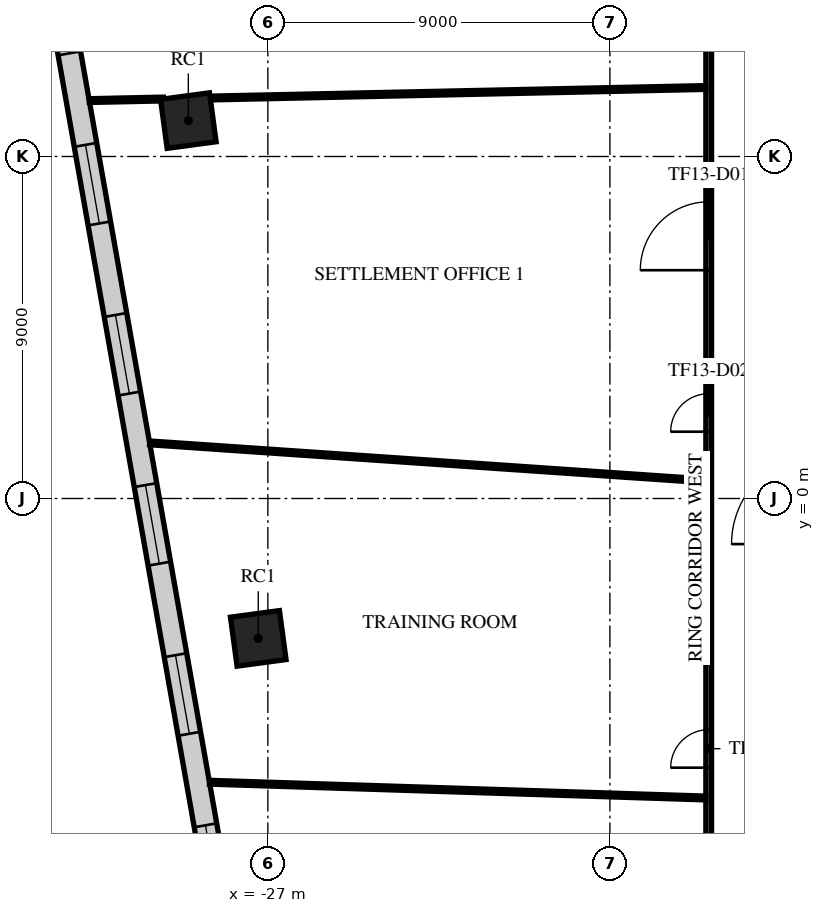
"""IFC4 building model, lengths in metres.
Left out: names, types, materials, properties, quantities, classifications, styles, units other than length and angle.
Written with IfcOpenShell. Run it as: python <this file> out.ifc"""

import sys

from ifc_helpers import new_model, si_unit, direction, frame, frame_2d, origin, origin_2d, place, context, subcontext, project, spatial, rectangle, extrude, element, fill, save


model = new_model("IFC4")
c1 = context("Model", 3, precision=1e-05, world=origin(), true_north=direction((0.0, 1.0)))
c2 = subcontext(c1, "Body", "Model", "MODEL_VIEW")
j1 = project(units=[si_unit("LENGTHUNIT", "METRE"), si_unit("PLANEANGLEUNIT", "RADIAN")], contexts=[c1])
p1 = place(None, origin())
s1 = spatial("IfcSite", under=j1, at=p1, CompositionType="ELEMENT")
p2 = place(p1, origin())
s2 = spatial("IfcBuilding", under=s1, at=p2, CompositionType="ELEMENT")
p3 = place(p2, frame((0.0, 0.0, 59.7)))
s3 = spatial("IfcBuildingStorey", under=s2, at=p3, CompositionType="ELEMENT", Elevation=59.7)
for number, where, z_axis, x_axis in (
    (1, (-29.093, 9.945, 0.0), (0.0, 0.0, 1.0), (0.991, 0.134, 0.0)),
    (2, (-27.253, -3.681, 0.0), (0.0, 0.0, 1.0), (0.991, 0.134, 0.0)),
):
    element("IfcColumn", number, at=place(p3, frame(where, z_axis=z_axis, x_axis=x_axis)), inside=s3, PredefinedType="COLUMN", context=c2, shape_type="SweptSolid", body=[
        extrude(rectangle(XDim=1.3, YDim=1.3, at=origin_2d()), origin(), (0.0, 0.0, 1.0), 4.2),
    ])
p4 = place(p3, frame((-33.568, 19.341, 0.0), z_axis=(0.0, 0.0, 1.0), x_axis=(0.173645642064, -0.984808200104, 0.0)))
e3 = element("IfcWall", 3, at=p4, inside=s3, PredefinedType="STANDARD", context=c2, shape_type="SweptSolid", body=[
    extrude(rectangle(XDim=49.752, YDim=0.6, at=frame_2d((24.876, 0.0))), origin(), (0.0, 0.0, 1.0), 3.75),
])
p5 = place(p4, frame((1.161, 0.0, 0.9)))
e4 = element("IfcOpeningElement", 4, at=p5, cuts=e3, PredefinedType="OPENING", context=c2, shape_type="SweptSolid", body=[
    extrude(rectangle(XDim=2.1, YDim=2.1, at=frame_2d((1.05, 1.05))), frame((0.0, 0.31, 0.0), z_axis=(0.0, -1.0, 0.0), x_axis=(1.0, 0.0, 0.0)), (0.0, 0.0, 1.0), 0.62),
])
p6 = place(p4, frame((5.644, 0.0, 0.9)))
e5 = element("IfcOpeningElement", 5, at=p6, cuts=e3, PredefinedType="OPENING", context=c2, shape_type="SweptSolid", body=[
    extrude(rectangle(XDim=2.1, YDim=2.1, at=frame_2d((1.05, 1.05))), frame((0.0, 0.31, 0.0), z_axis=(0.0, -1.0, 0.0), x_axis=(1.0, 0.0, 0.0)), (0.0, 0.0, 1.0), 0.62),
])
p7 = place(p4, frame((10.189, 0.0, 0.9)))
e6 = element("IfcOpeningElement", 6, at=p7, cuts=e3, PredefinedType="OPENING", context=c2, shape_type="SweptSolid", body=[
    extrude(rectangle(XDim=2.1, YDim=2.1, at=frame_2d((1.05, 1.05))), frame((0.0, 0.31, 0.0), z_axis=(0.0, -1.0, 0.0), x_axis=(1.0, 0.0, 0.0)), (0.0, 0.0, 1.0), 0.62),
])
p8 = place(p4, frame((14.735, 0.0, 0.9)))
e7 = element("IfcOpeningElement", 7, at=p8, cuts=e3, PredefinedType="OPENING", context=c2, shape_type="SweptSolid", body=[
    extrude(rectangle(XDim=2.1, YDim=2.1, at=frame_2d((1.05, 1.05))), frame((0.0, 0.31, 0.0), z_axis=(0.0, -1.0, 0.0), x_axis=(1.0, 0.0, 0.0)), (0.0, 0.0, 1.0), 0.62),
])
p9 = place(p4, frame((19.28, 0.0, 0.9)))
e8 = element("IfcOpeningElement", 8, at=p9, cuts=e3, PredefinedType="OPENING", context=c2, shape_type="SweptSolid", body=[
    extrude(rectangle(XDim=2.1, YDim=2.1, at=frame_2d((1.05, 1.05))), frame((0.0, 0.31, 0.0), z_axis=(0.0, -1.0, 0.0), x_axis=(1.0, 0.0, 0.0)), (0.0, 0.0, 1.0), 0.62),
])
p10 = place(p4, frame((23.826, 0.0, 0.9)))
e9 = element("IfcOpeningElement", 9, at=p10, cuts=e3, PredefinedType="OPENING", context=c2, shape_type="SweptSolid", body=[
    extrude(rectangle(XDim=2.1, YDim=2.1, at=frame_2d((1.05, 1.05))), frame((0.0, 0.31, 0.0), z_axis=(0.0, -1.0, 0.0), x_axis=(1.0, 0.0, 0.0)), (0.0, 0.0, 1.0), 0.62),
])
p11 = place(p4, frame((28.371, 0.0, 0.9)))
e10 = element("IfcOpeningElement", 10, at=p11, cuts=e3, PredefinedType="OPENING", context=c2, shape_type="SweptSolid", body=[
    extrude(rectangle(XDim=2.1, YDim=2.1, at=frame_2d((1.05, 1.05))), frame((0.0, 0.31, 0.0), z_axis=(0.0, -1.0, 0.0), x_axis=(1.0, 0.0, 0.0)), (0.0, 0.0, 1.0), 0.62),
])
p12 = place(p4, frame((32.917, 0.0, 0.9)))
e11 = element("IfcOpeningElement", 11, at=p12, cuts=e3, PredefinedType="OPENING", context=c2, shape_type="SweptSolid", body=[
    extrude(rectangle(XDim=2.1, YDim=2.1, at=frame_2d((1.05, 1.05))), frame((0.0, 0.31, 0.0), z_axis=(0.0, -1.0, 0.0), x_axis=(1.0, 0.0, 0.0)), (0.0, 0.0, 1.0), 0.62),
])
p13 = place(p4, frame((37.462, 0.0, 0.9)))
e12 = element("IfcOpeningElement", 12, at=p13, cuts=e3, PredefinedType="OPENING", context=c2, shape_type="SweptSolid", body=[
    extrude(rectangle(XDim=2.1, YDim=2.1, at=frame_2d((1.05, 1.05))), frame((0.0, 0.31, 0.0), z_axis=(0.0, -1.0, 0.0), x_axis=(1.0, 0.0, 0.0)), (0.0, 0.0, 1.0), 0.62),
])
p14 = place(p4, frame((42.008, 0.0, 0.9)))
e13 = element("IfcOpeningElement", 13, at=p14, cuts=e3, PredefinedType="OPENING", context=c2, shape_type="SweptSolid", body=[
    extrude(rectangle(XDim=2.1, YDim=2.1, at=frame_2d((1.05, 1.05))), frame((0.0, 0.31, 0.0), z_axis=(0.0, -1.0, 0.0), x_axis=(1.0, 0.0, 0.0)), (0.0, 0.0, 1.0), 0.62),
])
p15 = place(p4, frame((46.491, 0.0, 0.9)))
e14 = element("IfcOpeningElement", 14, at=p15, cuts=e3, PredefinedType="OPENING", context=c2, shape_type="SweptSolid", body=[
    extrude(rectangle(XDim=2.1, YDim=2.1, at=frame_2d((1.05, 1.05))), frame((0.0, 0.31, 0.0), z_axis=(0.0, -1.0, 0.0), x_axis=(1.0, 0.0, 0.0)), (0.0, 0.0, 1.0), 0.62),
])
p16 = place(p3, frame((-15.4, -15.4, 0.0), z_axis=(0.0, 0.0, 1.0), x_axis=(0.0, 1.0, 0.0)))
e15 = element("IfcWall", 15, at=p16, inside=s3, PredefinedType="PARTITIONING", context=c2, shape_type="SweptSolid", body=[
    extrude(rectangle(XDim=30.8, YDim=0.15, at=frame_2d((15.4, 0.0))), origin(), (0.0, 0.0, 1.0), 3.25),
])
p17 = place(p16, frame((21.408, 0.0, 0.0)))
e16 = element("IfcOpeningElement", 16, at=p17, cuts=e15, PredefinedType="OPENING", context=c2, shape_type="SweptSolid", body=[
    extrude(rectangle(XDim=1.8, YDim=2.1, at=frame_2d((0.9, 1.05))), frame((0.0, 0.085, 0.0), z_axis=(0.0, -1.0, 0.0), x_axis=(1.0, 0.0, 0.0)), (0.0, 0.0, 1.0), 0.17),
])
p18 = place(p16, frame((17.158, 0.0, 0.0)))
e17 = element("IfcOpeningElement", 17, at=p18, cuts=e15, PredefinedType="OPENING", context=c2, shape_type="SweptSolid", body=[
    extrude(rectangle(XDim=1.0, YDim=2.1, at=frame_2d((0.5, 1.05))), frame((0.0, 0.085, 0.0), z_axis=(0.0, -1.0, 0.0), x_axis=(1.0, 0.0, 0.0)), (0.0, 0.0, 1.0), 0.17),
])
p19 = place(p16, frame((8.316, 0.0, 0.0)))
e18 = element("IfcOpeningElement", 18, at=p19, cuts=e15, PredefinedType="OPENING", context=c2, shape_type="SweptSolid", body=[
    extrude(rectangle(XDim=1.0, YDim=2.1, at=frame_2d((0.5, 1.05))), frame((0.0, 0.085, 0.0), z_axis=(0.0, -1.0, 0.0), x_axis=(1.0, 0.0, 0.0)), (0.0, 0.0, 1.0), 0.17),
])
p20 = place(p16, frame((28.516, 0.0, 0.0)))
e19 = element("IfcOpeningElement", 19, at=p20, cuts=e15, PredefinedType="OPENING", context=c2, shape_type="SweptSolid", body=[
    extrude(rectangle(XDim=1.8, YDim=2.1, at=frame_2d((0.9, 1.05))), frame((0.0, 0.085, 0.0), z_axis=(0.0, -1.0, 0.0), x_axis=(1.0, 0.0, 0.0)), (0.0, 0.0, 1.0), 0.17),
])
p21 = place(p16, frame((2.8, 0.0, 0.0)))
e20 = element("IfcOpeningElement", 20, at=p21, cuts=e15, PredefinedType="OPENING", context=c2, shape_type="SweptSolid", body=[
    extrude(rectangle(XDim=1.0, YDim=2.1, at=frame_2d((0.5, 1.05))), frame((0.0, 0.085, 0.0), z_axis=(0.0, -1.0, 0.0), x_axis=(1.0, 0.0, 0.0)), (0.0, 0.0, 1.0), 0.17),
])
p22 = place(p3, frame((-31.698, 10.471, 0.0), z_axis=(0.0, 0.0, 1.0), x_axis=(0.999775991134, 0.021165243956, 0.0)))
e21 = element("IfcWall", 21, at=p22, inside=s3, PredefinedType="PARTITIONING", context=c2, shape_type="SweptSolid", body=[
    extrude(rectangle(XDim=1.949, YDim=0.1, at=frame_2d((0.975, 0.0))), origin(), (0.0, 0.0, 1.0), 3.75),
])
p23 = place(p3, frame((-30.11, 1.464, 0.0), z_axis=(0.0, 0.0, 1.0), x_axis=(0.997671325377, -0.068205032957, 0.0)))
e22 = element("IfcWall", 22, at=p23, inside=s3, PredefinedType="PARTITIONING", context=c2, shape_type="SweptSolid", body=[
    extrude(rectangle(XDim=14.665, YDim=0.1, at=frame_2d((7.333, 0.0))), origin(), (0.0, 0.0, 1.0), 2.95),
])
p24 = place(p3, frame((-28.535, -7.467, 0.0), z_axis=(0.0, 0.0, 1.0), x_axis=(0.999495289336, -0.031767382577, 0.0)))
e23 = element("IfcWall", 23, at=p24, inside=s3, PredefinedType="PARTITIONING", context=c2, shape_type="SweptSolid", body=[
    extrude(rectangle(XDim=13.065, YDim=0.1, at=frame_2d((6.532, 0.0))), origin(), (0.0, 0.0, 1.0), 2.95),
])
p25 = place(p3, frame((-28.517, 10.539, 0.0), z_axis=(0.0, 0.0, 1.0), x_axis=(0.999774736742, 0.02122441454, 0.0)))
e24 = element("IfcWall", 24, at=p25, inside=s3, PredefinedType="PARTITIONING", context=c2, shape_type="SweptSolid", body=[
    extrude(rectangle(XDim=13.044, YDim=0.1, at=frame_2d((6.522, 0.0))), origin(), (0.0, 0.0, 1.0), 3.25),
])
p26 = place(p6, origin())
e25 = element("IfcWindow", 25, at=p26, inside=s3, PartitioningType="SINGLE_PANEL", PredefinedType="WINDOW", context=c2, shape_type="SweptSolid", body=[
    extrude(rectangle(XDim=2.1, YDim=2.1, at=frame_2d((1.05, 1.05))), frame((0.0, 0.03, 0.0), z_axis=(0.0, -1.0, 0.0), x_axis=(1.0, 0.0, 0.0)), (0.0, 0.0, 1.0), 0.06),
])
fill(e5, e25)
p27 = place(p7, origin())
e26 = element("IfcWindow", 26, at=p27, inside=s3, PartitioningType="SINGLE_PANEL", PredefinedType="WINDOW", context=c2, shape_type="SweptSolid", body=[
    extrude(rectangle(XDim=2.1, YDim=2.1, at=frame_2d((1.05, 1.05))), frame((0.0, 0.03, 0.0), z_axis=(0.0, -1.0, 0.0), x_axis=(1.0, 0.0, 0.0)), (0.0, 0.0, 1.0), 0.06),
])
fill(e6, e26)
p28 = place(p8, origin())
e27 = element("IfcWindow", 27, at=p28, inside=s3, PartitioningType="SINGLE_PANEL", PredefinedType="WINDOW", context=c2, shape_type="SweptSolid", body=[
    extrude(rectangle(XDim=2.1, YDim=2.1, at=frame_2d((1.05, 1.05))), frame((0.0, 0.03, 0.0), z_axis=(0.0, -1.0, 0.0), x_axis=(1.0, 0.0, 0.0)), (0.0, 0.0, 1.0), 0.06),
])
fill(e7, e27)
p29 = place(p9, origin())
e28 = element("IfcWindow", 28, at=p29, inside=s3, PartitioningType="SINGLE_PANEL", PredefinedType="WINDOW", context=c2, shape_type="SweptSolid", body=[
    extrude(rectangle(XDim=2.1, YDim=2.1, at=frame_2d((1.05, 1.05))), frame((0.0, 0.03, 0.0), z_axis=(0.0, -1.0, 0.0), x_axis=(1.0, 0.0, 0.0)), (0.0, 0.0, 1.0), 0.06),
])
fill(e8, e28)
p30 = place(p10, origin())
e29 = element("IfcWindow", 29, at=p30, inside=s3, PartitioningType="SINGLE_PANEL", PredefinedType="WINDOW", context=c2, shape_type="SweptSolid", body=[
    extrude(rectangle(XDim=2.1, YDim=2.1, at=frame_2d((1.05, 1.05))), frame((0.0, 0.03, 0.0), z_axis=(0.0, -1.0, 0.0), x_axis=(1.0, 0.0, 0.0)), (0.0, 0.0, 1.0), 0.06),
])
fill(e9, e29)
p31 = place(p11, origin())
e30 = element("IfcWindow", 30, at=p31, inside=s3, PartitioningType="SINGLE_PANEL", PredefinedType="WINDOW", context=c2, shape_type="SweptSolid", body=[
    extrude(rectangle(XDim=2.1, YDim=2.1, at=frame_2d((1.05, 1.05))), frame((0.0, 0.03, 0.0), z_axis=(0.0, -1.0, 0.0), x_axis=(1.0, 0.0, 0.0)), (0.0, 0.0, 1.0), 0.06),
])
fill(e10, e30)
p32 = place(p17, origin())
e31 = element("IfcDoor", 31, at=p32, inside=s3, OperationType="DOUBLE_DOOR_SINGLE_SWING", PredefinedType="DOOR", context=c2, shape_type="SweptSolid", body=[
    extrude(rectangle(XDim=1.8, YDim=2.1, at=frame_2d((0.9, 1.05))), frame((0.0, 0.025, 0.0), z_axis=(0.0, -1.0, 0.0), x_axis=(1.0, 0.0, 0.0)), (0.0, 0.0, 1.0), 0.05),
])
fill(e16, e31)
p33 = place(p18, origin())
e32 = element("IfcDoor", 32, at=p33, inside=s3, OperationType="SINGLE_SWING_LEFT", PredefinedType="DOOR", context=c2, shape_type="SweptSolid", body=[
    extrude(rectangle(XDim=1.0, YDim=2.1, at=frame_2d((0.5, 1.05))), frame((0.0, 0.025, 0.0), z_axis=(0.0, -1.0, 0.0), x_axis=(1.0, 0.0, 0.0)), (0.0, 0.0, 1.0), 0.05),
])
fill(e17, e32)
p34 = place(p19, origin())
e33 = element("IfcDoor", 33, at=p34, inside=s3, OperationType="SINGLE_SWING_RIGHT", PredefinedType="DOOR", context=c2, shape_type="SweptSolid", body=[
    extrude(rectangle(XDim=1.0, YDim=2.1, at=frame_2d((0.5, 1.05))), frame((0.0, 0.025, 0.0), z_axis=(0.0, -1.0, 0.0), x_axis=(1.0, 0.0, 0.0)), (0.0, 0.0, 1.0), 0.05),
])
fill(e18, e33)
save(model, sys.argv[1])
